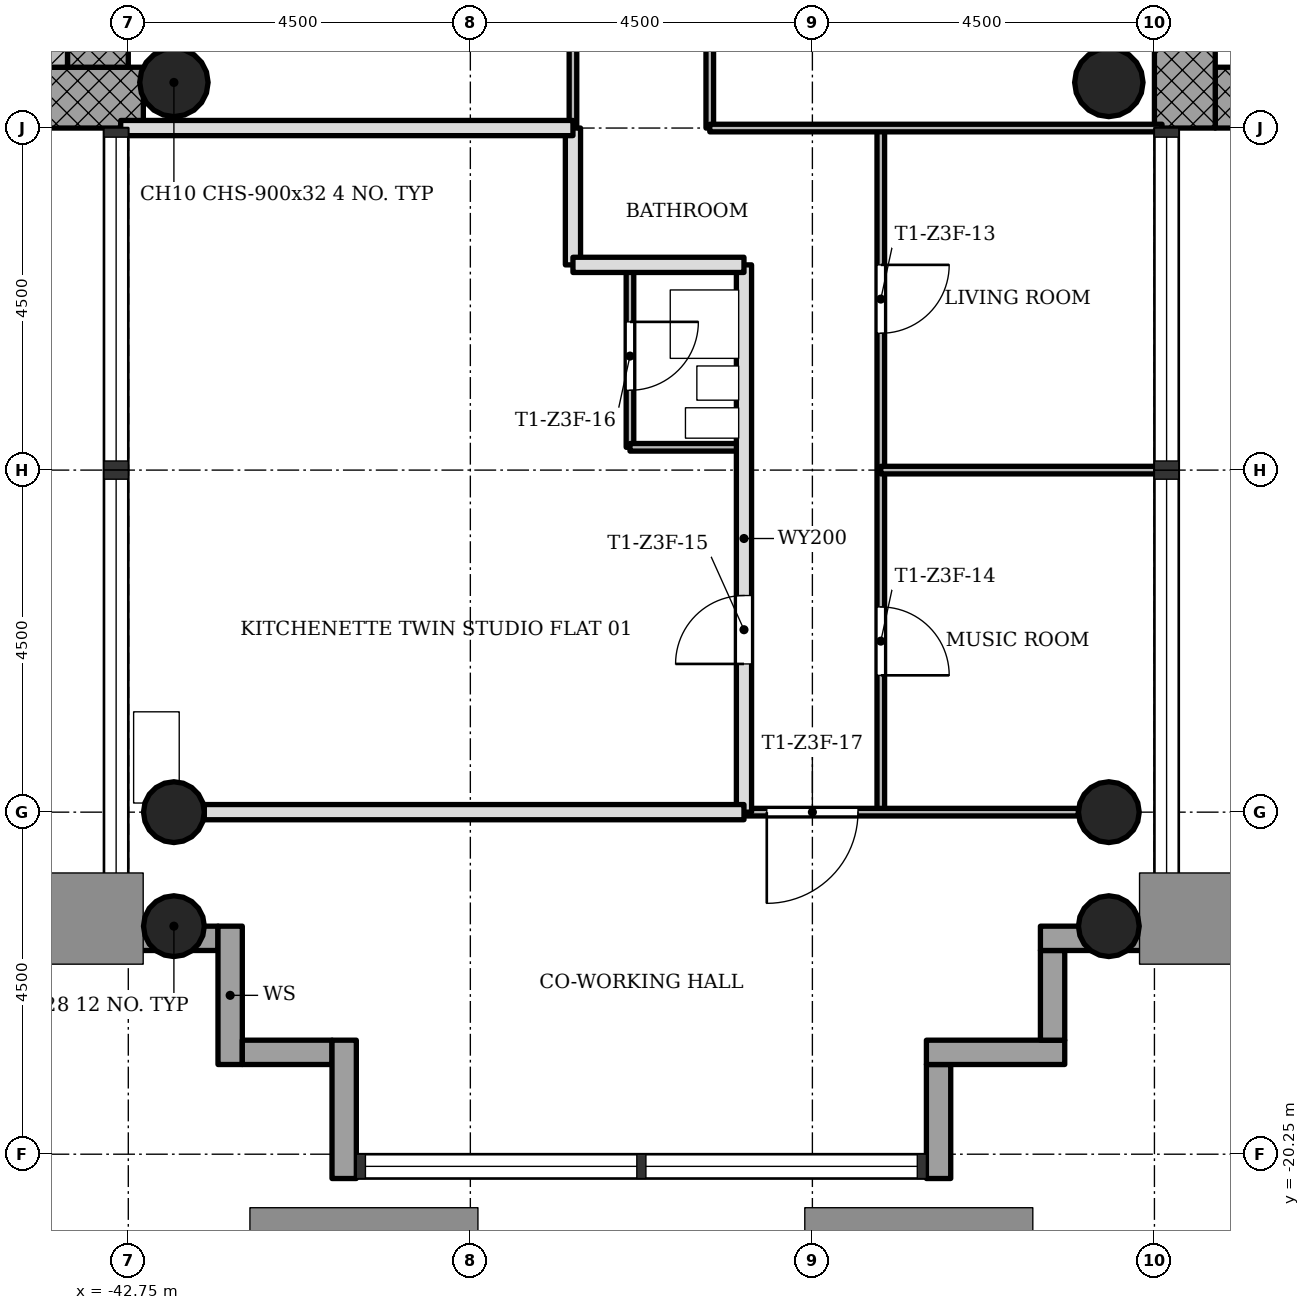
"""IFC4 building model, lengths in metres.
Left out: names, types, materials, properties, quantities, classifications, styles, units other than length and angle.
Written with IfcOpenShell. Run it as: python <this file> out.ifc"""

import sys

from ifc_helpers import new_model, si_unit, direction, frame, frame_2d, origin, origin_2d, place, context, subcontext, project, spatial, rectangle, hollow_circle, extrude, element, fill, save


model = new_model("IFC4")
c1 = context("Model", 3, precision=1e-05, world=origin(), true_north=direction((0.0, 1.0)))
c2 = subcontext(c1, "Body", "Model", "MODEL_VIEW")
j1 = project(units=[si_unit("LENGTHUNIT", "METRE"), si_unit("PLANEANGLEUNIT", "RADIAN")], contexts=[c1])
p1 = place(None, origin())
s1 = spatial("IfcSite", under=j1, at=p1, CompositionType="ELEMENT")
p2 = place(p1, origin())
s2 = spatial("IfcBuilding", under=s1, at=p2, CompositionType="ELEMENT")
p3 = place(p2, frame((0.0, 0.0, 164.3)))
s3 = spatial("IfcBuildingStorey", under=s2, at=p3, CompositionType="ELEMENT", Elevation=164.3)
p4 = place(p3, frame((-28.45, -6.35, 0.0), z_axis=(0.0, 0.0, 1.0), x_axis=(1.0, 0.0, 0.0)))
e1 = element("IfcWall", 1, at=p4, inside=s3, PredefinedType="SHEAR", context=c2, shape_type="SweptSolid", body=[
    extrude(rectangle(XDim=8.2, YDim=0.8, at=frame_2d((4.1, 0.0))), origin(), (0.0, 0.0, 1.0), 3.4),
])
p5 = place(p3, frame((-28.85, 5.95, 0.0), z_axis=(0.0, 0.0, 1.0), x_axis=(0.0, -1.0, 0.0)))
e2 = element("IfcWall", 2, at=p5, inside=s3, PredefinedType="SHEAR", context=c2, shape_type="SweptSolid", body=[
    extrude(rectangle(XDim=12.7, YDim=0.8, at=frame_2d((6.35, 0.0))), origin(), (0.0, 0.0, 1.0), 3.4),
])
p6 = place(p5, frame((5.05, 0.0, 0.0)))
e3 = element("IfcOpeningElement", 3, at=p6, cuts=e2, PredefinedType="OPENING", context=c2, shape_type="SweptSolid", body=[
    extrude(rectangle(XDim=1.8, YDim=2.1, at=frame_2d((0.9, 1.05))), frame((0.0, 0.41, 0.0), z_axis=(0.0, -1.0, 0.0), x_axis=(1.0, 0.0, 0.0)), (0.0, 0.0, 1.0), 0.82),
])
p7 = place(p3, frame((-50.95, -6.35, 0.0), z_axis=(0.0, 0.0, 1.0), x_axis=(1.0, 0.0, 0.0)))
e4 = element("IfcWall", 4, at=p7, inside=s3, PredefinedType="SHEAR", context=c2, shape_type="SweptSolid", body=[
    extrude(rectangle(XDim=8.398, YDim=0.8, at=frame_2d((4.199, 0.0))), origin(), (0.0, 0.0, 1.0), 3.4),
])
p8 = place(p3, frame((-43.15, -5.95, 0.0), z_axis=(0.0, 0.0, 1.0), x_axis=(0.0, 1.0, 0.0)))
e5 = element("IfcWall", 5, at=p8, inside=s3, PredefinedType="SHEAR", context=c2, shape_type="SweptSolid", body=[
    extrude(rectangle(XDim=12.7, YDim=0.8, at=frame_2d((6.35, 0.0))), origin(), (0.0, 0.0, 1.0), 3.4),
])
p9 = place(p8, frame((5.05, 0.0, 0.0)))
e6 = element("IfcOpeningElement", 6, at=p9, cuts=e5, PredefinedType="OPENING", context=c2, shape_type="SweptSolid", body=[
    extrude(rectangle(XDim=1.8, YDim=2.1, at=frame_2d((0.9, 1.05))), frame((0.0, 0.41, 0.0), z_axis=(0.0, -1.0, 0.0), x_axis=(1.0, 0.0, 0.0)), (0.0, 0.0, 1.0), 0.82),
])
for number, where, z_axis, x_axis in (
    (7, (-42.15, -15.75, 0.0), (0.0, 0.0, 1.0), (1.0, 0.0, 0.0)),
    (8, (-29.85, -15.75, 0.0), (0.0, 0.0, 1.0), (1.0, 0.0, 0.0)),
    (9, (-42.15, -17.25, 0.0), (0.0, 0.0, 1.0), (1.0, 0.0, 0.0)),
    (10, (-29.85, -17.25, 0.0), (0.0, 0.0, 1.0), (1.0, 0.0, 0.0)),
):
    element("IfcColumn", number, at=place(p3, frame(where, z_axis=z_axis, x_axis=x_axis)), inside=s3, PredefinedType="COLUMN", context=c2, shape_type="SweptSolid", body=[
        extrude(hollow_circle(Radius=0.4, WallThickness=0.028, at=origin_2d()), origin(), (0.0, 0.0, 1.0), 3.4),
    ])
for number, where, z_axis, x_axis in (
    (11, (-42.15, -6.15, 0.0), (0.0, 0.0, 1.0), (1.0, 0.0, 0.0)),
    (12, (-29.85, -6.15, 0.0), (0.0, 0.0, 1.0), (1.0, 0.0, 0.0)),
):
    element("IfcColumn", number, at=place(p3, frame(where, z_axis=z_axis, x_axis=x_axis)), inside=s3, PredefinedType="COLUMN", context=c2, shape_type="SweptSolid", body=[
        extrude(hollow_circle(Radius=0.45, WallThickness=0.032, at=origin_2d()), origin(), (0.0, 0.0, 1.0), 3.4),
    ])
p10 = place(p3, frame((-43.07, -17.41, -0.3), z_axis=(0.0, 0.0, 1.0), x_axis=(1.0, 0.0, 0.0)))
e13 = element("IfcWall", 13, at=p10, inside=s3, PredefinedType="STANDARD", context=c2, shape_type="SweptSolid", body=[
    extrude(rectangle(XDim=1.5, YDim=0.32, at=frame_2d((0.75, 0.0))), origin(), (0.0, 0.0, 1.0), 3.4),
])
p11 = place(p3, frame((-41.41, -17.25, -0.3), z_axis=(0.0, 0.0, 1.0), x_axis=(0.0, -1.0, 0.0)))
e14 = element("IfcWall", 14, at=p11, inside=s3, PredefinedType="STANDARD", context=c2, shape_type="SweptSolid", body=[
    extrude(rectangle(XDim=1.82, YDim=0.32, at=frame_2d((0.91, 0.0))), origin(), (0.0, 0.0, 1.0), 3.4),
])
p12 = place(p3, frame((-41.25, -18.91, -0.3), z_axis=(0.0, 0.0, 1.0), x_axis=(1.0, 0.0, 0.0)))
e15 = element("IfcWall", 15, at=p12, inside=s3, PredefinedType="STANDARD", context=c2, shape_type="SweptSolid", body=[
    extrude(rectangle(XDim=1.18, YDim=0.32, at=frame_2d((0.59, 0.0))), origin(), (0.0, 0.0, 1.0), 3.4),
])
p13 = place(p3, frame((-39.91, -18.75, -0.3), z_axis=(0.0, 0.0, 1.0), x_axis=(0.0, -1.0, 0.0)))
e16 = element("IfcWall", 16, at=p13, inside=s3, PredefinedType="STANDARD", context=c2, shape_type="SweptSolid", body=[
    extrude(rectangle(XDim=1.82, YDim=0.32, at=frame_2d((0.91, 0.0))), origin(), (0.0, 0.0, 1.0), 3.4),
])
p14 = place(p3, frame((-32.09, -20.57, -0.3), z_axis=(0.0, 0.0, 1.0), x_axis=(0.0, 1.0, 0.0)))
e17 = element("IfcWall", 17, at=p14, inside=s3, PredefinedType="STANDARD", context=c2, shape_type="SweptSolid", body=[
    extrude(rectangle(XDim=1.5, YDim=0.32, at=frame_2d((0.75, 0.0))), origin(), (0.0, 0.0, 1.0), 3.4),
])
p15 = place(p3, frame((-32.25, -18.91, -0.3), z_axis=(0.0, 0.0, 1.0), x_axis=(1.0, 0.0, 0.0)))
e18 = element("IfcWall", 18, at=p15, inside=s3, PredefinedType="STANDARD", context=c2, shape_type="SweptSolid", body=[
    extrude(rectangle(XDim=1.82, YDim=0.32, at=frame_2d((0.91, 0.0))), origin(), (0.0, 0.0, 1.0), 3.4),
])
p16 = place(p3, frame((-30.59, -18.75, -0.3), z_axis=(0.0, 0.0, 1.0), x_axis=(0.0, 1.0, 0.0)))
e19 = element("IfcWall", 19, at=p16, inside=s3, PredefinedType="STANDARD", context=c2, shape_type="SweptSolid", body=[
    extrude(rectangle(XDim=1.18, YDim=0.32, at=frame_2d((0.59, 0.0))), origin(), (0.0, 0.0, 1.0), 3.4),
])
p17 = place(p3, frame((-30.75, -17.41, -0.3), z_axis=(0.0, 0.0, 1.0), x_axis=(1.0, 0.0, 0.0)))
e20 = element("IfcWall", 20, at=p17, inside=s3, PredefinedType="STANDARD", context=c2, shape_type="SweptSolid", body=[
    extrude(rectangle(XDim=1.82, YDim=0.32, at=frame_2d((0.91, 0.0))), origin(), (0.0, 0.0, 1.0), 3.4),
])
p18 = place(p3, frame((-36.9, -6.75, 0.0), z_axis=(0.0, 0.0, 1.0), x_axis=(0.0, 1.0, 0.0)))
e21 = element("IfcWall", 21, at=p18, inside=s3, PredefinedType="PARTITIONING", context=c2, shape_type="SweptSolid", body=[
    extrude(rectangle(XDim=2.25, YDim=0.1, at=frame_2d((1.125, 0.0))), origin(), (0.0, 0.0, 1.0), 3.0),
])
p19 = place(p3, frame((-36.9, -8.55, 0.0), z_axis=(0.0, 0.0, 1.0), x_axis=(0.0, 1.0, 0.0)))
e22 = element("IfcWall", 22, at=p19, inside=s3, PredefinedType="SOLIDWALL", context=c2, shape_type="SweptSolid", body=[
    extrude(rectangle(XDim=1.8, YDim=0.2, at=frame_2d((0.9, 0.0))), origin(), (0.0, 0.0, 1.0), 3.0),
])
p20 = place(p3, frame((-36.15, -10.95, 0.0), z_axis=(0.0, 0.0, 1.0), x_axis=(0.0, 1.0, 0.0)))
e23 = element("IfcWall", 23, at=p20, inside=s3, PredefinedType="PARTITIONING", context=c2, shape_type="SweptSolid", body=[
    extrude(rectangle(XDim=2.4, YDim=0.1, at=frame_2d((1.2, 0.0))), origin(), (0.0, 0.0, 1.0), 3.0),
])
p21 = place(p20, frame((0.75, 0.0, 0.0)))
e24 = element("IfcOpeningElement", 24, at=p21, cuts=e23, PredefinedType="OPENING", context=c2, shape_type="SweptSolid", body=[
    extrude(rectangle(XDim=0.9, YDim=2.1, at=frame_2d((0.45, 1.05))), frame((0.0, 0.06, 0.0), z_axis=(0.0, -1.0, 0.0), x_axis=(1.0, 0.0, 0.0)), (0.0, 0.0, 1.0), 0.12),
])
p22 = place(p3, frame((-35.1, -6.75, 0.0), z_axis=(0.0, 0.0, 1.0), x_axis=(0.0, 1.0, 0.0)))
e25 = element("IfcWall", 25, at=p22, inside=s3, PredefinedType="PARTITIONING", context=c2, shape_type="SweptSolid", body=[
    extrude(rectangle(XDim=2.25, YDim=0.1, at=frame_2d((1.125, 0.0))), origin(), (0.0, 0.0, 1.0), 3.0),
])
p23 = place(p3, frame((-34.65, -15.75, 0.0), z_axis=(0.0, 0.0, 1.0), x_axis=(0.0, 1.0, 0.0)))
e26 = element("IfcWall", 26, at=p23, inside=s3, PredefinedType="SOLIDWALL", context=c2, shape_type="SweptSolid", body=[
    extrude(rectangle(XDim=7.2, YDim=0.2, at=frame_2d((3.6, 0.0))), origin(), (0.0, 0.0, 1.0), 3.0),
])
p24 = place(p23, frame((1.95, 0.0, 0.0)))
e27 = element("IfcOpeningElement", 27, at=p24, cuts=e26, PredefinedType="OPENING", context=c2, shape_type="SweptSolid", body=[
    extrude(rectangle(XDim=0.9, YDim=2.1, at=frame_2d((0.45, 1.05))), frame((0.0, 0.11, 0.0), z_axis=(0.0, -1.0, 0.0), x_axis=(1.0, 0.0, 0.0)), (0.0, 0.0, 1.0), 0.22),
])
p25 = place(p3, frame((-32.85, -15.75, 0.0), z_axis=(0.0, 0.0, 1.0), x_axis=(0.0, 1.0, 0.0)))
e28 = element("IfcWall", 28, at=p25, inside=s3, PredefinedType="PARTITIONING", context=c2, shape_type="SweptSolid", body=[
    extrude(rectangle(XDim=9.0, YDim=0.1, at=frame_2d((4.5, 0.0))), origin(), (0.0, 0.0, 1.0), 3.0),
])
p26 = place(p25, frame((6.3, 0.0, 0.0)))
e29 = element("IfcOpeningElement", 29, at=p26, cuts=e28, PredefinedType="OPENING", context=c2, shape_type="SweptSolid", body=[
    extrude(rectangle(XDim=0.9, YDim=2.1, at=frame_2d((0.45, 1.05))), frame((0.0, 0.06, 0.0), z_axis=(0.0, -1.0, 0.0), x_axis=(1.0, 0.0, 0.0)), (0.0, 0.0, 1.0), 0.12),
])
p27 = place(p25, frame((1.8, 0.0, 0.0)))
e30 = element("IfcOpeningElement", 30, at=p27, cuts=e28, PredefinedType="OPENING", context=c2, shape_type="SweptSolid", body=[
    extrude(rectangle(XDim=0.9, YDim=2.1, at=frame_2d((0.45, 1.05))), frame((0.0, 0.06, 0.0), z_axis=(0.0, -1.0, 0.0), x_axis=(1.0, 0.0, 0.0)), (0.0, 0.0, 1.0), 0.12),
])
p28 = place(p3, frame((-34.65, -15.75, 0.0), z_axis=(0.0, 0.0, 1.0), x_axis=(1.0, 0.0, 0.0)))
e31 = element("IfcWall", 31, at=p28, inside=s3, PredefinedType="PARTITIONING", context=c2, shape_type="SweptSolid", body=[
    extrude(rectangle(XDim=4.4, YDim=0.1, at=frame_2d((2.2, 0.0))), origin(), (0.0, 0.0, 1.0), 3.0),
])
p29 = place(p28, frame((0.3, 0.0, 0.0)))
e32 = element("IfcOpeningElement", 32, at=p29, cuts=e31, PredefinedType="OPENING", context=c2, shape_type="SweptSolid", body=[
    extrude(rectangle(XDim=1.2, YDim=2.1, at=frame_2d((0.6, 1.05))), frame((0.0, 0.06, 0.0), z_axis=(0.0, -1.0, 0.0), x_axis=(1.0, 0.0, 0.0)), (0.0, 0.0, 1.0), 0.12),
])
p30 = place(p3, frame((-41.75, -15.75, 0.0), z_axis=(0.0, 0.0, 1.0), x_axis=(1.0, 0.0, 0.0)))
e33 = element("IfcWall", 33, at=p30, inside=s3, PredefinedType="SOLIDWALL", context=c2, shape_type="SweptSolid", body=[
    extrude(rectangle(XDim=7.1, YDim=0.2, at=frame_2d((3.55, 0.0))), origin(), (0.0, 0.0, 1.0), 3.0),
])
p31 = place(p3, frame((-32.85, -11.25, 0.0), z_axis=(0.0, 0.0, 1.0), x_axis=(1.0, 0.0, 0.0)))
e34 = element("IfcWall", 34, at=p31, inside=s3, PredefinedType="PARTITIONING", context=c2, shape_type="SweptSolid", body=[
    extrude(rectangle(XDim=3.7, YDim=0.1, at=frame_2d((1.85, 0.0))), origin(), (0.0, 0.0, 1.0), 3.0),
])
p32 = place(p3, frame((-36.15, -10.95, 0.0), z_axis=(0.0, 0.0, 1.0), x_axis=(1.0, 0.0, 0.0)))
e35 = element("IfcWall", 35, at=p32, inside=s3, PredefinedType="PARTITIONING", context=c2, shape_type="SweptSolid", body=[
    extrude(rectangle(XDim=1.5, YDim=0.1, at=frame_2d((0.75, 0.0))), origin(), (0.0, 0.0, 1.0), 3.0),
])
p33 = place(p3, frame((-36.9, -8.55, 0.0), z_axis=(0.0, 0.0, 1.0), x_axis=(1.0, 0.0, 0.0)))
e36 = element("IfcWall", 36, at=p33, inside=s3, PredefinedType="SOLIDWALL", context=c2, shape_type="SweptSolid", body=[
    extrude(rectangle(XDim=2.25, YDim=0.2, at=frame_2d((1.125, 0.0))), origin(), (0.0, 0.0, 1.0), 3.0),
])
p34 = place(p3, frame((-35.1, -6.75, 0.0), z_axis=(0.0, 0.0, 1.0), x_axis=(1.0, 0.0, 0.0)))
e37 = element("IfcWall", 37, at=p34, inside=s3, PredefinedType="PARTITIONING", context=c2, shape_type="SweptSolid", body=[
    extrude(rectangle(XDim=5.95, YDim=0.1, at=frame_2d((2.975, 0.0))), origin(), (0.0, 0.0, 1.0), 3.0),
])
p35 = place(p3, frame((-42.85, -6.75, 0.0), z_axis=(0.0, 0.0, 1.0), x_axis=(1.0, 0.0, 0.0)))
e38 = element("IfcWall", 38, at=p35, inside=s3, PredefinedType="SOLIDWALL", context=c2, shape_type="SweptSolid", body=[
    extrude(rectangle(XDim=5.95, YDim=0.2, at=frame_2d((2.975, 0.0))), origin(), (0.0, 0.0, 1.0), 3.0),
])
p36 = place(p3, frame((-43.75, -1.85, 0.0), z_axis=(0.0, 0.0, 1.0), x_axis=(0.0, -1.0, 0.0)))
e39 = element("IfcWall", 39, at=p36, inside=s3, PredefinedType="SHEAR", context=c2, shape_type="SweptSolid", body=[
    extrude(rectangle(XDim=4.1, YDim=0.4, at=frame_2d((2.05, 0.0))), origin(), (0.0, 0.0, 1.0), 3.4),
])
p37 = place(p26, origin())
e40 = element("IfcDoor", 40, at=p37, inside=s3, OperationType="SINGLE_SWING_RIGHT", PredefinedType="DOOR", context=c2, shape_type="SweptSolid", body=[
    extrude(rectangle(XDim=0.9, YDim=2.1, at=frame_2d((0.45, 1.05))), frame((0.0, 0.025, 0.0), z_axis=(0.0, -1.0, 0.0), x_axis=(1.0, 0.0, 0.0)), (0.0, 0.0, 1.0), 0.05),
])
fill(e29, e40)
p38 = place(p27, origin())
e41 = element("IfcDoor", 41, at=p38, inside=s3, OperationType="SINGLE_SWING_LEFT", PredefinedType="DOOR", context=c2, shape_type="SweptSolid", body=[
    extrude(rectangle(XDim=0.9, YDim=2.1, at=frame_2d((0.45, 1.05))), frame((0.0, 0.025, 0.0), z_axis=(0.0, -1.0, 0.0), x_axis=(1.0, 0.0, 0.0)), (0.0, 0.0, 1.0), 0.05),
])
fill(e30, e41)
p39 = place(p24, origin())
e42 = element("IfcDoor", 42, at=p39, inside=s3, OperationType="SINGLE_SWING_RIGHT", PredefinedType="DOOR", context=c2, shape_type="SweptSolid", body=[
    extrude(rectangle(XDim=0.9, YDim=2.1, at=frame_2d((0.45, 1.05))), frame((0.0, 0.025, 0.0), z_axis=(0.0, -1.0, 0.0), x_axis=(1.0, 0.0, 0.0)), (0.0, 0.0, 1.0), 0.05),
])
fill(e27, e42)
p40 = place(p21, origin())
e43 = element("IfcDoor", 43, at=p40, inside=s3, OperationType="SINGLE_SWING_RIGHT", PredefinedType="DOOR", context=c2, shape_type="SweptSolid", body=[
    extrude(rectangle(XDim=0.9, YDim=2.1, at=frame_2d((0.45, 1.05))), frame((0.0, 0.025, 0.0), z_axis=(0.0, -1.0, 0.0), x_axis=(1.0, 0.0, 0.0)), (0.0, 0.0, 1.0), 0.05),
])
fill(e24, e43)
p41 = place(p29, origin())
e44 = element("IfcDoor", 44, at=p41, inside=s3, OperationType="SINGLE_SWING_LEFT", PredefinedType="DOOR", context=c2, shape_type="SweptSolid", body=[
    extrude(rectangle(XDim=1.2, YDim=2.1, at=frame_2d((0.6, 1.05))), frame((0.0, 0.025, 0.0), z_axis=(0.0, -1.0, 0.0), x_axis=(1.0, 0.0, 0.0)), (0.0, 0.0, 1.0), 0.05),
])
fill(e32, e44)
save(model, sys.argv[1])
